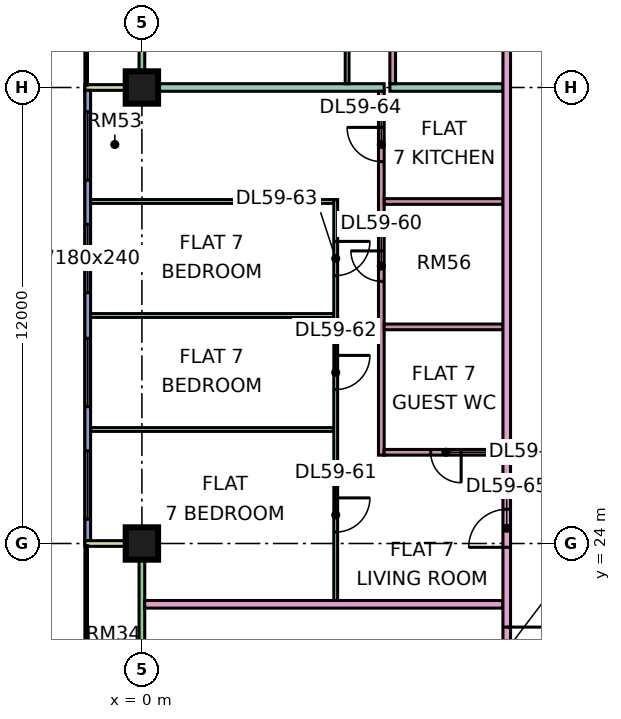
"""IFC4 building model, lengths in metres.
Left out: names, types, materials, properties, quantities, classifications, styles, units other than length and angle.
Written with IfcOpenShell. Run it as: python <this file> out.ifc"""

import sys

from ifc_helpers import new_model, si_unit, direction, frame, frame_2d, origin, origin_2d, place, context, subcontext, project, spatial, rectangle, extrude, element, fill, save


model = new_model("IFC4")
c1 = context("Model", 3, precision=1e-05, world=origin(), true_north=direction((0.0, 1.0)))
c2 = subcontext(c1, "Body", "Model", "MODEL_VIEW")
j1 = project(units=[si_unit("LENGTHUNIT", "METRE"), si_unit("PLANEANGLEUNIT", "RADIAN")], contexts=[c1])
p1 = place(None, origin())
s1 = spatial("IfcSite", under=j1, at=p1, CompositionType="ELEMENT")
p2 = place(p1, origin())
s2 = spatial("IfcBuilding", under=s1, at=p2, CompositionType="ELEMENT")
p3 = place(p2, frame((0.0, 0.0, 249.15)))
s3 = spatial("IfcBuildingStorey", under=s2, at=p3, CompositionType="ELEMENT", Elevation=249.15)
p4 = place(p3, frame((0.0, 24.0, 0.0), z_axis=(0.0, 0.0, 1.0), x_axis=(1.0, 0.0, 0.0)))
e1 = element("IfcColumn", 1, at=p4, inside=s3, PredefinedType="COLUMN", context=c2, shape_type="SweptSolid", body=[
    extrude(rectangle(XDim=0.85, YDim=0.85, at=origin_2d()), origin(), (0.0, 0.0, 1.0), 3.75),
])
p5 = place(p3, frame((0.0, 36.0, 0.0), z_axis=(0.0, 0.0, 1.0), x_axis=(1.0, 0.0, 0.0)))
e2 = element("IfcColumn", 2, at=p5, inside=s3, PredefinedType="COLUMN", context=c2, shape_type="SweptSolid", body=[
    extrude(rectangle(XDim=0.85, YDim=0.85, at=origin_2d()), origin(), (0.0, 0.0, 1.0), 3.75),
])
p6 = place(p3, frame((0.0, 47.925, 0.0), z_axis=(0.0, 0.0, 1.0), x_axis=(0.0, -1.0, 0.0)))
e3 = element("IfcWall", 3, at=p6, inside=s3, PredefinedType="SOLIDWALL", context=c2, shape_type="SweptSolid", body=[
    extrude(rectangle(XDim=11.85, YDim=0.15, at=frame_2d((5.925, 0.0))), origin(), (0.0, 0.0, 1.0), 3.35),
])
p7 = place(p6, frame((0.6, 0.0, 0.45)))
e4 = element("IfcOpeningElement", 4, at=p7, cuts=e3, PredefinedType="OPENING", context=c2, shape_type="SweptSolid", body=[
    extrude(rectangle(XDim=1.2, YDim=2.4, at=frame_2d((0.6, 1.2))), frame((0.0, 0.085, 0.0), z_axis=(0.0, -1.0, 0.0), x_axis=(1.0, 0.0, 0.0)), (0.0, 0.0, 1.0), 0.17),
])
p8 = place(p6, frame((4.087, 0.0, 0.0)))
e5 = element("IfcOpeningElement", 5, at=p8, cuts=e3, PredefinedType="OPENING", context=c2, shape_type="SweptSolid", body=[
    extrude(rectangle(XDim=1.2, YDim=2.4, at=frame_2d((0.6, 1.2))), frame((0.0, 0.085, 0.0), z_axis=(0.0, -1.0, 0.0), x_axis=(1.0, 0.0, 0.0)), (0.0, 0.0, 1.0), 0.17),
])
p9 = place(p6, frame((6.525, 0.0, 0.45)))
e6 = element("IfcOpeningElement", 6, at=p9, cuts=e3, PredefinedType="OPENING", context=c2, shape_type="SweptSolid", body=[
    extrude(rectangle(XDim=1.8, YDim=2.4, at=frame_2d((0.9, 1.2))), frame((0.0, 0.085, 0.0), z_axis=(0.0, -1.0, 0.0), x_axis=(1.0, 0.0, 0.0)), (0.0, 0.0, 1.0), 0.17),
])
p10 = place(p6, frame((9.562, 0.0, 0.45)))
e7 = element("IfcOpeningElement", 7, at=p10, cuts=e3, PredefinedType="OPENING", context=c2, shape_type="SweptSolid", body=[
    extrude(rectangle(XDim=1.2, YDim=2.4, at=frame_2d((0.6, 1.2))), frame((0.0, 0.085, 0.0), z_axis=(0.0, -1.0, 0.0), x_axis=(1.0, 0.0, 0.0)), (0.0, 0.0, 1.0), 0.17),
])
p11 = place(p3, frame((-1.5, 36.0, 0.0), z_axis=(0.0, 0.0, 1.0), x_axis=(1.0, 0.0, 0.0)))
e8 = element("IfcWall", 8, at=p11, inside=s3, PredefinedType="SOLIDWALL", context=c2, shape_type="SweptSolid", body=[
    extrude(rectangle(XDim=1.5, YDim=0.15, at=frame_2d((0.75, 0.0))), origin(), (0.0, 0.0, 1.0), 3.35),
])
p12 = place(p3, frame((-1.425, 35.925, 0.0), z_axis=(0.0, 0.0, 1.0), x_axis=(0.0, -1.0, 0.0)))
e9 = element("IfcWall", 9, at=p12, inside=s3, PredefinedType="SOLIDWALL", context=c2, shape_type="SweptSolid", body=[
    extrude(rectangle(XDim=11.85, YDim=0.15, at=frame_2d((5.925, 0.0))), origin(), (0.0, 0.0, 1.0), 3.35),
])
p13 = place(p12, frame((0.562, 0.0, 0.45)))
e10 = element("IfcOpeningElement", 10, at=p13, cuts=e9, PredefinedType="OPENING", context=c2, shape_type="SweptSolid", body=[
    extrude(rectangle(XDim=1.8, YDim=2.4, at=frame_2d((0.9, 1.2))), frame((0.0, 0.085, 0.0), z_axis=(0.0, -1.0, 0.0), x_axis=(1.0, 0.0, 0.0)), (0.0, 0.0, 1.0), 0.17),
])
p14 = place(p12, frame((3.525, 0.0, 0.45)))
e11 = element("IfcOpeningElement", 11, at=p14, cuts=e9, PredefinedType="OPENING", context=c2, shape_type="SweptSolid", body=[
    extrude(rectangle(XDim=1.8, YDim=2.4, at=frame_2d((0.9, 1.2))), frame((0.0, 0.085, 0.0), z_axis=(0.0, -1.0, 0.0), x_axis=(1.0, 0.0, 0.0)), (0.0, 0.0, 1.0), 0.17),
])
p15 = place(p12, frame((6.525, 0.0, 0.45)))
e12 = element("IfcOpeningElement", 12, at=p15, cuts=e9, PredefinedType="OPENING", context=c2, shape_type="SweptSolid", body=[
    extrude(rectangle(XDim=1.8, YDim=2.4, at=frame_2d((0.9, 1.2))), frame((0.0, 0.085, 0.0), z_axis=(0.0, -1.0, 0.0), x_axis=(1.0, 0.0, 0.0)), (0.0, 0.0, 1.0), 0.17),
])
p16 = place(p12, frame((9.488, 0.0, 0.45)))
e13 = element("IfcOpeningElement", 13, at=p16, cuts=e9, PredefinedType="OPENING", context=c2, shape_type="SweptSolid", body=[
    extrude(rectangle(XDim=1.8, YDim=2.4, at=frame_2d((0.9, 1.2))), frame((0.0, 0.085, 0.0), z_axis=(0.0, -1.0, 0.0), x_axis=(1.0, 0.0, 0.0)), (0.0, 0.0, 1.0), 0.17),
])
p17 = place(p3, frame((0.0, 23.925, 0.0), z_axis=(0.0, 0.0, 1.0), x_axis=(0.0, -1.0, 0.0)))
e14 = element("IfcWall", 14, at=p17, inside=s3, PredefinedType="SOLIDWALL", context=c2, shape_type="SweptSolid", body=[
    extrude(rectangle(XDim=11.35, YDim=0.15, at=frame_2d((5.675, 0.0))), origin(), (0.0, 0.0, 1.0), 3.35),
])
p18 = place(p17, frame((6.738, 0.0, 0.0)))
e15 = element("IfcOpeningElement", 15, at=p18, cuts=e14, PredefinedType="OPENING", context=c2, shape_type="SweptSolid", body=[
    extrude(rectangle(XDim=1.8, YDim=2.4, at=frame_2d((0.9, 1.2))), frame((0.0, 0.085, 0.0), z_axis=(0.0, -1.0, 0.0), x_axis=(1.0, 0.0, 0.0)), (0.0, 0.0, 1.0), 0.17),
])
p19 = place(p3, frame((-1.5, 24.0, 0.0), z_axis=(0.0, 0.0, 1.0), x_axis=(1.0, 0.0, 0.0)))
e16 = element("IfcWall", 16, at=p19, inside=s3, PredefinedType="SOLIDWALL", context=c2, shape_type="SweptSolid", body=[
    extrude(rectangle(XDim=1.5, YDim=0.15, at=frame_2d((0.75, 0.0))), origin(), (0.0, 0.0, 1.0), 3.35),
])
for number, where, z_axis, x_axis in (
    (17, (-1.351, 27.0, 0.0), (0.0, 0.0, 1.0), (1.0, 0.0, 0.0)),
    (18, (-1.351, 30.0, 0.0), (0.0, 0.0, 1.0), (1.0, 0.0, 0.0)),
):
    element("IfcWall", number, at=place(p3, frame(where, z_axis=z_axis, x_axis=x_axis)), inside=s3, PredefinedType="PARTITIONING", context=c2, shape_type="SweptSolid", body=[
        extrude(rectangle(XDim=6.401, YDim=0.1, at=frame_2d((3.201, 0.0))), origin(), (0.0, 0.0, 1.0), 3.35),
    ])
p20 = place(p3, frame((-1.35, 33.0, 0.0), z_axis=(0.0, 0.0, 1.0), x_axis=(1.0, 0.0, 0.0)))
e19 = element("IfcWall", 19, at=p20, inside=s3, PredefinedType="PARTITIONING", context=c2, shape_type="SweptSolid", body=[
    extrude(rectangle(XDim=6.4, YDim=0.1, at=frame_2d((3.2, 0.0))), origin(), (0.0, 0.0, 1.0), 3.35),
])
e20 = element("IfcWall", 20, at=p5, inside=s3, PredefinedType="PARTITIONING", context=c2, shape_type="SweptSolid", body=[
    extrude(rectangle(XDim=6.375, YDim=0.2, at=frame_2d((3.188, 0.0))), origin(), (0.0, 0.0, 1.0), 3.35),
])
p21 = place(p3, frame((0.074, 22.4, 0.0), z_axis=(0.0, 0.0, 1.0), x_axis=(1.0, 0.0, 0.0)))
e21 = element("IfcWall", 21, at=p21, inside=s3, PredefinedType="PARTITIONING", context=c2, shape_type="SweptSolid", body=[
    extrude(rectangle(XDim=9.426, YDim=0.2, at=frame_2d((4.713, 0.0))), origin(), (0.0, 0.0, 1.0), 3.35),
])
p22 = place(p3, frame((5.1, 22.5, 0.0), z_axis=(0.0, 0.0, 1.0), x_axis=(0.0, 1.0, 0.0)))
e22 = element("IfcWall", 22, at=p22, inside=s3, PredefinedType="PARTITIONING", context=c2, shape_type="SweptSolid", body=[
    extrude(rectangle(XDim=10.55, YDim=0.1, at=frame_2d((5.275, 0.0))), origin(), (0.0, 0.0, 1.0), 3.35),
])
p23 = place(p22, frame((1.8, 0.0, 0.0)))
e23 = element("IfcOpeningElement", 23, at=p23, cuts=e22, PredefinedType="OPENING", context=c2, shape_type="SweptSolid", body=[
    extrude(rectangle(XDim=0.9, YDim=2.1, at=frame_2d((0.45, 1.05))), frame((0.0, 0.06, 0.0), z_axis=(0.0, -1.0, 0.0), x_axis=(1.0, 0.0, 0.0)), (0.0, 0.0, 1.0), 0.12),
])
p24 = place(p22, frame((5.55, 0.0, 0.0)))
e24 = element("IfcOpeningElement", 24, at=p24, cuts=e22, PredefinedType="OPENING", context=c2, shape_type="SweptSolid", body=[
    extrude(rectangle(XDim=0.9, YDim=2.1, at=frame_2d((0.45, 1.05))), frame((0.0, 0.06, 0.0), z_axis=(0.0, -1.0, 0.0), x_axis=(1.0, 0.0, 0.0)), (0.0, 0.0, 1.0), 0.12),
])
p25 = place(p22, frame((8.55, 0.0, 0.0)))
e25 = element("IfcOpeningElement", 25, at=p25, cuts=e22, PredefinedType="OPENING", context=c2, shape_type="SweptSolid", body=[
    extrude(rectangle(XDim=0.9, YDim=2.1, at=frame_2d((0.45, 1.05))), frame((0.0, 0.06, 0.0), z_axis=(0.0, -1.0, 0.0), x_axis=(1.0, 0.0, 0.0)), (0.0, 0.0, 1.0), 0.12),
])
p26 = place(p3, frame((5.4, 36.1, 0.0), z_axis=(0.0, 0.0, 1.0), x_axis=(0.0, 1.0, 0.0)))
e26 = element("IfcWall", 26, at=p26, inside=s3, PredefinedType="PARTITIONING", context=c2, shape_type="SweptSolid", body=[
    extrude(rectangle(XDim=26.95, YDim=0.1, at=frame_2d((13.475, 0.0))), origin(), (0.0, 0.0, 1.0), 3.35),
])
p27 = place(p26, frame((0.95, 0.0, 0.0)))
e27 = element("IfcOpeningElement", 27, at=p27, cuts=e26, PredefinedType="OPENING", context=c2, shape_type="SweptSolid", body=[
    extrude(rectangle(XDim=0.9, YDim=2.1, at=frame_2d((0.45, 1.05))), frame((0.0, 0.06, 0.0), z_axis=(0.0, -1.0, 0.0), x_axis=(1.0, 0.0, 0.0)), (0.0, 0.0, 1.0), 0.12),
])
p28 = place(p26, frame((3.95, 0.0, 0.0)))
e28 = element("IfcOpeningElement", 28, at=p28, cuts=e26, PredefinedType="OPENING", context=c2, shape_type="SweptSolid", body=[
    extrude(rectangle(XDim=0.9, YDim=2.1, at=frame_2d((0.45, 1.05))), frame((0.0, 0.06, 0.0), z_axis=(0.0, -1.0, 0.0), x_axis=(1.0, 0.0, 0.0)), (0.0, 0.0, 1.0), 0.12),
])
p29 = place(p26, frame((6.95, 0.0, 0.0)))
e29 = element("IfcOpeningElement", 29, at=p29, cuts=e26, PredefinedType="OPENING", context=c2, shape_type="SweptSolid", body=[
    extrude(rectangle(XDim=0.9, YDim=2.1, at=frame_2d((0.45, 1.05))), frame((0.0, 0.06, 0.0), z_axis=(0.0, -1.0, 0.0), x_axis=(1.0, 0.0, 0.0)), (0.0, 0.0, 1.0), 0.12),
])
p30 = place(p26, frame((9.95, 0.0, 0.0)))
e30 = element("IfcOpeningElement", 30, at=p30, cuts=e26, PredefinedType="OPENING", context=c2, shape_type="SweptSolid", body=[
    extrude(rectangle(XDim=0.9, YDim=2.1, at=frame_2d((0.45, 1.05))), frame((0.0, 0.06, 0.0), z_axis=(0.0, -1.0, 0.0), x_axis=(1.0, 0.0, 0.0)), (0.0, 0.0, 1.0), 0.12),
])
p31 = place(p26, frame((21.95, 0.0, 0.0)))
e31 = element("IfcOpeningElement", 31, at=p31, cuts=e26, PredefinedType="OPENING", context=c2, shape_type="SweptSolid", body=[
    extrude(rectangle(XDim=0.9, YDim=2.1, at=frame_2d((0.45, 1.05))), frame((0.0, 0.06, 0.0), z_axis=(0.0, -1.0, 0.0), x_axis=(1.0, 0.0, 0.0)), (0.0, 0.0, 1.0), 0.12),
])
p32 = place(p26, frame((24.95, 0.0, 0.0)))
e32 = element("IfcOpeningElement", 32, at=p32, cuts=e26, PredefinedType="OPENING", context=c2, shape_type="SweptSolid", body=[
    extrude(rectangle(XDim=0.9, YDim=2.1, at=frame_2d((0.45, 1.05))), frame((0.0, 0.06, 0.0), z_axis=(0.0, -1.0, 0.0), x_axis=(1.0, 0.0, 0.0)), (0.0, 0.0, 1.0), 0.12),
])
p33 = place(p26, frame((15.95, 0.0, 0.0)))
e33 = element("IfcOpeningElement", 33, at=p33, cuts=e26, PredefinedType="OPENING", context=c2, shape_type="SweptSolid", body=[
    extrude(rectangle(XDim=0.9, YDim=2.1, at=frame_2d((0.45, 1.05))), frame((0.0, 0.06, 0.0), z_axis=(0.0, -1.0, 0.0), x_axis=(1.0, 0.0, 0.0)), (0.0, 0.0, 1.0), 0.12),
])
p34 = place(p3, frame((6.3, 26.325, 0.0), z_axis=(0.0, 0.0, 1.0), x_axis=(0.0, 1.0, 0.0)))
e34 = element("IfcWall", 34, at=p34, inside=s3, PredefinedType="PARTITIONING", context=c2, shape_type="SweptSolid", body=[
    extrude(rectangle(XDim=9.575, YDim=0.15, at=frame_2d((4.788, 0.0))), origin(), (0.0, 0.0, 1.0), 3.35),
])
p35 = place(p34, frame((4.575, 0.0, 0.0)))
e35 = element("IfcOpeningElement", 35, at=p35, cuts=e34, PredefinedType="OPENING", context=c2, shape_type="SweptSolid", body=[
    extrude(rectangle(XDim=0.8, YDim=2.1, at=frame_2d((0.4, 1.05))), frame((0.0, 0.085, 0.0), z_axis=(0.0, -1.0, 0.0), x_axis=(1.0, 0.0, 0.0)), (0.0, 0.0, 1.0), 0.17),
])
p36 = place(p34, frame((7.725, 0.0, 0.0)))
e36 = element("IfcOpeningElement", 36, at=p36, cuts=e34, PredefinedType="OPENING", context=c2, shape_type="SweptSolid", body=[
    extrude(rectangle(XDim=0.9, YDim=2.1, at=frame_2d((0.45, 1.05))), frame((0.0, 0.085, 0.0), z_axis=(0.0, -1.0, 0.0), x_axis=(1.0, 0.0, 0.0)), (0.0, 0.0, 1.0), 0.17),
])
p37 = place(p3, frame((6.375, 26.4, 0.0), z_axis=(0.0, 0.0, 1.0), x_axis=(1.0, 0.0, 0.0)))
e37 = element("IfcWall", 37, at=p37, inside=s3, PredefinedType="PARTITIONING", context=c2, shape_type="SweptSolid", body=[
    extrude(rectangle(XDim=3.125, YDim=0.15, at=frame_2d((1.562, 0.0))), origin(), (0.0, 0.0, 1.0), 3.35),
])
p38 = place(p37, frame((1.225, 0.0, 0.0)))
e38 = element("IfcOpeningElement", 38, at=p38, cuts=e37, PredefinedType="OPENING", context=c2, shape_type="SweptSolid", body=[
    extrude(rectangle(XDim=0.8, YDim=2.1, at=frame_2d((0.4, 1.05))), frame((0.0, 0.085, 0.0), z_axis=(0.0, -1.0, 0.0), x_axis=(1.0, 0.0, 0.0)), (0.0, 0.0, 1.0), 0.17),
])
for number, where, z_axis, x_axis in (
    (39, (6.375, 29.7, 0.0), (0.0, 0.0, 1.0), (1.0, 0.0, 0.0)),
    (40, (6.375, 33.0, 0.0), (0.0, 0.0, 1.0), (1.0, 0.0, 0.0)),
):
    element("IfcWall", number, at=place(p3, frame(where, z_axis=z_axis, x_axis=x_axis)), inside=s3, PredefinedType="PARTITIONING", context=c2, shape_type="SweptSolid", body=[
        extrude(rectangle(XDim=3.125, YDim=0.15, at=frame_2d((1.562, 0.0))), origin(), (0.0, 0.0, 1.0), 3.35),
    ])
p39 = place(p3, frame((6.525, 36.0, 0.0), z_axis=(0.0, 0.0, 1.0), x_axis=(1.0, 0.0, 0.0)))
e41 = element("IfcWall", 41, at=p39, inside=s3, PredefinedType="PARTITIONING", context=c2, shape_type="SweptSolid", body=[
    extrude(rectangle(XDim=2.975, YDim=0.2, at=frame_2d((1.488, 0.0))), origin(), (0.0, 0.0, 1.0), 3.35),
])
p40 = place(p3, frame((6.6, 36.1, 0.0), z_axis=(0.0, 0.0, 1.0), x_axis=(0.0, 1.0, 0.0)))
e42 = element("IfcWall", 42, at=p40, inside=s3, PredefinedType="PARTITIONING", context=c2, shape_type="SweptSolid", body=[
    extrude(rectangle(XDim=12.275, YDim=0.15, at=frame_2d((6.137, 0.0))), origin(), (0.0, 0.0, 1.0), 3.35),
])
p41 = place(p40, frame((6.95, 0.0, 0.0)))
e43 = element("IfcOpeningElement", 43, at=p41, cuts=e42, PredefinedType="OPENING", context=c2, shape_type="SweptSolid", body=[
    extrude(rectangle(XDim=0.8, YDim=2.1, at=frame_2d((0.4, 1.05))), frame((0.0, 0.085, 0.0), z_axis=(0.0, -1.0, 0.0), x_axis=(1.0, 0.0, 0.0)), (0.0, 0.0, 1.0), 0.17),
])
p42 = place(p40, frame((2.75, 0.0, 0.0)))
e44 = element("IfcOpeningElement", 44, at=p42, cuts=e42, PredefinedType="OPENING", context=c2, shape_type="SweptSolid", body=[
    extrude(rectangle(XDim=0.9, YDim=2.1, at=frame_2d((0.45, 1.05))), frame((0.0, 0.085, 0.0), z_axis=(0.0, -1.0, 0.0), x_axis=(1.0, 0.0, 0.0)), (0.0, 0.0, 1.0), 0.17),
])
p43 = place(p40, frame((9.8, 0.0, 0.0)))
e45 = element("IfcOpeningElement", 45, at=p43, cuts=e42, PredefinedType="OPENING", context=c2, shape_type="SweptSolid", body=[
    extrude(rectangle(XDim=0.8, YDim=2.1, at=frame_2d((0.4, 1.05))), frame((0.0, 0.085, 0.0), z_axis=(0.0, -1.0, 0.0), x_axis=(1.0, 0.0, 0.0)), (0.0, 0.0, 1.0), 0.17),
])
p44 = place(p3, frame((9.6, 20.0, 0.0), z_axis=(0.0, 0.0, 1.0), x_axis=(0.0, 1.0, 0.0)))
e46 = element("IfcWall", 46, at=p44, inside=s3, PredefinedType="PARTITIONING", context=c2, shape_type="SweptSolid", body=[
    extrude(rectangle(XDim=44.35, YDim=0.2, at=frame_2d((22.175, 0.0))), origin(), (0.0, 0.0, 1.0), 3.35),
])
p45 = place(p44, frame((28.8, 0.0, 0.0)))
e47 = element("IfcOpeningElement", 47, at=p45, cuts=e46, PredefinedType="OPENING", context=c2, shape_type="SweptSolid", body=[
    extrude(rectangle(XDim=1.0, YDim=2.1, at=frame_2d((0.5, 1.05))), frame((0.0, 0.11, 0.0), z_axis=(0.0, -1.0, 0.0), x_axis=(1.0, 0.0, 0.0)), (0.0, 0.0, 1.0), 0.22),
])
p46 = place(p44, frame((0.6, 0.0, 0.0)))
e48 = element("IfcOpeningElement", 48, at=p46, cuts=e46, PredefinedType="OPENING", context=c2, shape_type="SweptSolid", body=[
    extrude(rectangle(XDim=1.2, YDim=2.1, at=frame_2d((0.6, 1.05))), frame((0.0, 0.11, 0.0), z_axis=(0.0, -1.0, 0.0), x_axis=(1.0, 0.0, 0.0)), (0.0, 0.0, 1.0), 0.22),
])
p47 = place(p44, frame((3.9, 0.0, 0.0)))
e49 = element("IfcOpeningElement", 49, at=p47, cuts=e46, PredefinedType="OPENING", context=c2, shape_type="SweptSolid", body=[
    extrude(rectangle(XDim=1.0, YDim=2.1, at=frame_2d((0.5, 1.05))), frame((0.0, 0.11, 0.0), z_axis=(0.0, -1.0, 0.0), x_axis=(1.0, 0.0, 0.0)), (0.0, 0.0, 1.0), 0.22),
])
p48 = place(p13, origin())
e50 = element("IfcWindow", 50, at=p48, inside=s3, PartitioningType="SINGLE_PANEL", PredefinedType="WINDOW", context=c2, shape_type="SweptSolid", body=[
    extrude(rectangle(XDim=1.8, YDim=2.4, at=frame_2d((0.9, 1.2))), frame((0.0, 0.03, 0.0), z_axis=(0.0, -1.0, 0.0), x_axis=(1.0, 0.0, 0.0)), (0.0, 0.0, 1.0), 0.06),
])
fill(e10, e50)
p49 = place(p14, origin())
e51 = element("IfcWindow", 51, at=p49, inside=s3, PartitioningType="SINGLE_PANEL", PredefinedType="WINDOW", context=c2, shape_type="SweptSolid", body=[
    extrude(rectangle(XDim=1.8, YDim=2.4, at=frame_2d((0.9, 1.2))), frame((0.0, 0.03, 0.0), z_axis=(0.0, -1.0, 0.0), x_axis=(1.0, 0.0, 0.0)), (0.0, 0.0, 1.0), 0.06),
])
fill(e11, e51)
p50 = place(p15, origin())
e52 = element("IfcWindow", 52, at=p50, inside=s3, PartitioningType="SINGLE_PANEL", PredefinedType="WINDOW", context=c2, shape_type="SweptSolid", body=[
    extrude(rectangle(XDim=1.8, YDim=2.4, at=frame_2d((0.9, 1.2))), frame((0.0, 0.03, 0.0), z_axis=(0.0, -1.0, 0.0), x_axis=(1.0, 0.0, 0.0)), (0.0, 0.0, 1.0), 0.06),
])
fill(e12, e52)
p51 = place(p16, origin())
e53 = element("IfcWindow", 53, at=p51, inside=s3, PartitioningType="SINGLE_PANEL", PredefinedType="WINDOW", context=c2, shape_type="SweptSolid", body=[
    extrude(rectangle(XDim=1.8, YDim=2.4, at=frame_2d((0.9, 1.2))), frame((0.0, 0.03, 0.0), z_axis=(0.0, -1.0, 0.0), x_axis=(1.0, 0.0, 0.0)), (0.0, 0.0, 1.0), 0.06),
])
fill(e13, e53)
p52 = place(p46, origin())
e54 = element("IfcDoor", 54, at=p52, inside=s3, OperationType="SINGLE_SWING_RIGHT", PredefinedType="DOOR", context=c2, shape_type="SweptSolid", body=[
    extrude(rectangle(XDim=1.2, YDim=2.1, at=frame_2d((0.6, 1.05))), frame((0.0, 0.025, 0.0), z_axis=(0.0, -1.0, 0.0), x_axis=(1.0, 0.0, 0.0)), (0.0, 0.0, 1.0), 0.05),
])
fill(e48, e54)
p53 = place(p35, frame((0.8, 0.0, 0.0), z_axis=(0.0, 0.0, 1.0), x_axis=(-1.0, 0.0, 0.0)))
e55 = element("IfcDoor", 55, at=p53, inside=s3, OperationType="SINGLE_SWING_RIGHT", PredefinedType="DOOR", context=c2, shape_type="SweptSolid", body=[
    extrude(rectangle(XDim=0.8, YDim=2.1, at=frame_2d((0.4, 1.05))), frame((0.0, 0.025, 0.0), z_axis=(0.0, -1.0, 0.0), x_axis=(1.0, 0.0, 0.0)), (0.0, 0.0, 1.0), 0.05),
])
fill(e35, e55)
p54 = place(p23, origin())
e56 = element("IfcDoor", 56, at=p54, inside=s3, OperationType="SINGLE_SWING_RIGHT", PredefinedType="DOOR", context=c2, shape_type="SweptSolid", body=[
    extrude(rectangle(XDim=0.9, YDim=2.1, at=frame_2d((0.45, 1.05))), frame((0.0, 0.025, 0.0), z_axis=(0.0, -1.0, 0.0), x_axis=(1.0, 0.0, 0.0)), (0.0, 0.0, 1.0), 0.05),
])
fill(e23, e56)
p55 = place(p24, origin())
e57 = element("IfcDoor", 57, at=p55, inside=s3, OperationType="SINGLE_SWING_RIGHT", PredefinedType="DOOR", context=c2, shape_type="SweptSolid", body=[
    extrude(rectangle(XDim=0.9, YDim=2.1, at=frame_2d((0.45, 1.05))), frame((0.0, 0.025, 0.0), z_axis=(0.0, -1.0, 0.0), x_axis=(1.0, 0.0, 0.0)), (0.0, 0.0, 1.0), 0.05),
])
fill(e24, e57)
p56 = place(p25, origin())
e58 = element("IfcDoor", 58, at=p56, inside=s3, OperationType="SINGLE_SWING_RIGHT", PredefinedType="DOOR", context=c2, shape_type="SweptSolid", body=[
    extrude(rectangle(XDim=0.9, YDim=2.1, at=frame_2d((0.45, 1.05))), frame((0.0, 0.025, 0.0), z_axis=(0.0, -1.0, 0.0), x_axis=(1.0, 0.0, 0.0)), (0.0, 0.0, 1.0), 0.05),
])
fill(e25, e58)
p57 = place(p36, frame((0.9, 0.0, 0.0), z_axis=(0.0, 0.0, 1.0), x_axis=(-1.0, 0.0, 0.0)))
e59 = element("IfcDoor", 59, at=p57, inside=s3, OperationType="SINGLE_SWING_RIGHT", PredefinedType="DOOR", context=c2, shape_type="SweptSolid", body=[
    extrude(rectangle(XDim=0.9, YDim=2.1, at=frame_2d((0.45, 1.05))), frame((0.0, 0.025, 0.0), z_axis=(0.0, -1.0, 0.0), x_axis=(1.0, 0.0, 0.0)), (0.0, 0.0, 1.0), 0.05),
])
fill(e36, e59)
p58 = place(p47, origin())
e60 = element("IfcDoor", 60, at=p58, inside=s3, OperationType="SINGLE_SWING_LEFT", PredefinedType="DOOR", context=c2, shape_type="SweptSolid", body=[
    extrude(rectangle(XDim=1.0, YDim=2.1, at=frame_2d((0.5, 1.05))), frame((0.0, 0.025, 0.0), z_axis=(0.0, -1.0, 0.0), x_axis=(1.0, 0.0, 0.0)), (0.0, 0.0, 1.0), 0.05),
])
fill(e49, e60)
p59 = place(p38, origin())
e61 = element("IfcDoor", 61, at=p59, inside=s3, OperationType="SINGLE_SWING_RIGHT", PredefinedType="DOOR", context=c2, shape_type="SweptSolid", body=[
    extrude(rectangle(XDim=0.8, YDim=2.1, at=frame_2d((0.4, 1.05))), frame((0.0, 0.025, 0.0), z_axis=(0.0, -1.0, 0.0), x_axis=(1.0, 0.0, 0.0)), (0.0, 0.0, 1.0), 0.05),
])
fill(e38, e61)
save(model, sys.argv[1])
